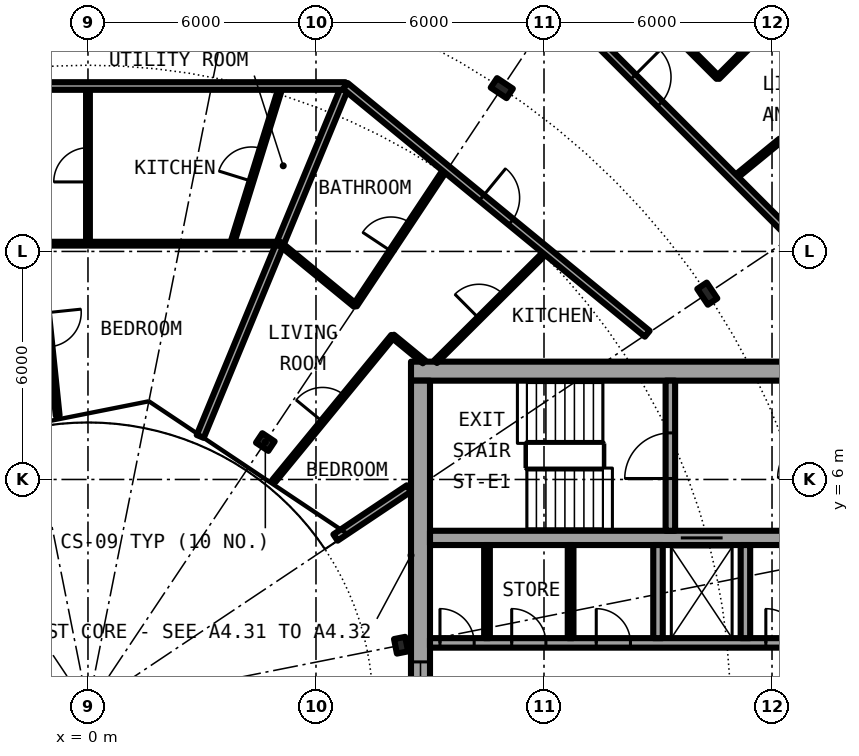
"""IFC4 building model, lengths in metres.
Left out: names, types, materials, properties, quantities, classifications, styles, units other than length and angle.
Written with IfcOpenShell. Run it as: python <this file> out.ifc"""

import sys

from ifc_helpers import new_model, si_unit, direction, frame, frame_2d, origin, origin_2d, place, context, subcontext, project, spatial, rectangle, i_section, extrude, element, fill, save


model = new_model("IFC4")
c1 = context("Model", 3, precision=1e-05, world=origin(), true_north=direction((0.0, 1.0)))
c2 = subcontext(c1, "Body", "Model", "MODEL_VIEW")
j1 = project(units=[si_unit("LENGTHUNIT", "METRE"), si_unit("PLANEANGLEUNIT", "RADIAN")], contexts=[c1])
p1 = place(None, origin())
s1 = spatial("IfcSite", under=j1, at=p1, CompositionType="ELEMENT")
p2 = place(p1, origin())
s2 = spatial("IfcBuilding", under=s1, at=p2, CompositionType="ELEMENT")
p3 = place(p2, frame((0.0, 0.0, 173.8)))
s3 = spatial("IfcBuildingStorey", under=s2, at=p3, CompositionType="ELEMENT", Elevation=173.8)
for number, where, z_axis, x_axis in (
    (1, (16.297, 10.889, 0.0), (0.0, 0.0, 1.0), (0.831, 0.556, 0.0)),
    (2, (10.889, 16.297, 0.0), (0.0, 0.0, 1.0), (0.556, 0.831, 0.0)),
):
    element("IfcColumn", number, at=place(p3, frame(where, z_axis=z_axis, x_axis=x_axis)), inside=s3, PredefinedType="COLUMN", context=c2, shape_type="SweptSolid", body=[
        extrude(i_section(OverallWidth=0.3, OverallDepth=0.5, WebThickness=0.014, FlangeThickness=0.028, FilletRadius=0.027, at=origin_2d()), origin(), (0.0, 0.0, 1.0), 3.05),
    ])
for number, where, z_axis, x_axis in (
    (3, (8.239, 1.639, 0.0), (0.0, 0.0, 1.0), (0.981, 0.195, 0.0)),
    (4, (4.667, 6.984, 0.0), (0.0, 0.0, 1.0), (0.556, 0.831, 0.0)),
):
    element("IfcColumn", number, at=place(p3, frame(where, z_axis=z_axis, x_axis=x_axis)), inside=s3, PredefinedType="COLUMN", context=c2, shape_type="SweptSolid", body=[
        extrude(i_section(OverallWidth=0.3, OverallDepth=0.39, WebThickness=0.011, FlangeThickness=0.019, FilletRadius=0.027, at=origin_2d()), origin(), (0.0, 0.0, 1.0), 3.05),
    ])
p4 = place(p3, frame((22.1, 8.85, 0.0), z_axis=(0.0, 0.0, 1.0), x_axis=(-1.0, 0.0, 0.0)))
e5 = element("IfcWall", 5, at=p4, inside=s3, PredefinedType="SHEAR", context=c2, shape_type="SweptSolid", body=[
    extrude(rectangle(XDim=13.6, YDim=0.5, at=frame_2d((6.8, 0.0))), origin(), (0.0, 0.0, 1.0), 3.05),
])
p5 = place(p4, frame((1.025, 0.0, 0.0)))
e6 = element("IfcOpeningElement", 6, at=p5, cuts=e5, PredefinedType="OPENING", context=c2, shape_type="SweptSolid", body=[
    extrude(rectangle(XDim=1.2, YDim=2.3, at=frame_2d((0.6, 1.15))), frame((0.0, 0.26, 0.0), z_axis=(0.0, -1.0, 0.0), x_axis=(1.0, 0.0, 0.0)), (0.0, 0.0, 1.0), 0.52),
])
p6 = place(p3, frame((8.75, -8.6, 0.0), z_axis=(0.0, 0.0, 1.0), x_axis=(0.0, 1.0, 0.0)))
e7 = element("IfcWall", 7, at=p6, inside=s3, PredefinedType="SHEAR", context=c2, shape_type="SweptSolid", body=[
    extrude(rectangle(XDim=17.2, YDim=0.5, at=frame_2d((8.6, 0.0))), origin(), (0.0, 0.0, 1.0), 3.05),
])
p7 = place(p6, frame((7.4, 0.0, 0.1)))
e8 = element("IfcOpeningElement", 8, at=p7, cuts=e7, PredefinedType="OPENING", context=c2, shape_type="SweptSolid", body=[
    extrude(rectangle(XDim=2.4, YDim=2.2, at=frame_2d((1.2, 1.1))), frame((0.0, 0.26, 0.0), z_axis=(0.0, -1.0, 0.0), x_axis=(1.0, 0.0, 0.0)), (0.0, 0.0, 1.0), 0.52),
])
p8 = place(p3, frame((9.0, 1.7, 0.0), z_axis=(0.0, 0.0, 1.0), x_axis=(1.0, 0.0, 0.0)))
e9 = element("IfcWall", 9, at=p8, inside=s3, PredefinedType="SHEAR", context=c2, shape_type="SweptSolid", body=[
    extrude(rectangle(XDim=10.15, YDim=0.25, at=frame_2d((5.075, 0.0))), origin(), (0.0, 0.0, 1.0), 3.05),
])
p9 = place(p8, frame((0.262, 0.0, 0.0)))
e10 = element("IfcOpeningElement", 10, at=p9, cuts=e9, PredefinedType="OPENING", context=c2, shape_type="SweptSolid", body=[
    extrude(rectangle(XDim=0.9, YDim=2.3, at=frame_2d((0.45, 1.15))), frame((0.0, 0.135, 0.0), z_axis=(0.0, -1.0, 0.0), x_axis=(1.0, 0.0, 0.0)), (0.0, 0.0, 1.0), 0.27),
])
p10 = place(p8, frame((2.15, 0.0, 0.0)))
e11 = element("IfcOpeningElement", 11, at=p10, cuts=e9, PredefinedType="OPENING", context=c2, shape_type="SweptSolid", body=[
    extrude(rectangle(XDim=0.9, YDim=2.3, at=frame_2d((0.45, 1.15))), frame((0.0, 0.135, 0.0), z_axis=(0.0, -1.0, 0.0), x_axis=(1.0, 0.0, 0.0)), (0.0, 0.0, 1.0), 0.27),
])
p11 = place(p8, frame((4.375, 0.0, 0.0)))
e12 = element("IfcOpeningElement", 12, at=p11, cuts=e9, PredefinedType="OPENING", context=c2, shape_type="SweptSolid", body=[
    extrude(rectangle(XDim=0.9, YDim=2.3, at=frame_2d((0.45, 1.15))), frame((0.0, 0.135, 0.0), z_axis=(0.0, -1.0, 0.0), x_axis=(1.0, 0.0, 0.0)), (0.0, 0.0, 1.0), 0.27),
])
p12 = place(p8, frame((8.837, 0.0, 0.0)))
e13 = element("IfcOpeningElement", 13, at=p12, cuts=e9, PredefinedType="OPENING", context=c2, shape_type="SweptSolid", body=[
    extrude(rectangle(XDim=0.9, YDim=2.3, at=frame_2d((0.45, 1.15))), frame((0.0, 0.135, 0.0), z_axis=(0.0, -1.0, 0.0), x_axis=(1.0, 0.0, 0.0)), (0.0, 0.0, 1.0), 0.27),
])
p13 = place(p3, frame((9.0, 4.462, 0.0), z_axis=(0.0, 0.0, 1.0), x_axis=(1.0, 0.0, 0.0)))
e14 = element("IfcWall", 14, at=p13, inside=s3, PredefinedType="SHEAR", context=c2, shape_type="SweptSolid", body=[
    extrude(rectangle(XDim=10.15, YDim=0.375, at=frame_2d((5.075, 0.0))), origin(), (0.0, 0.0, 1.0), 3.05),
])
p14 = place(p13, frame((6.6, 0.0, 0.0)))
e15 = element("IfcOpeningElement", 15, at=p14, cuts=e14, PredefinedType="OPENING", context=c2, shape_type="SweptSolid", body=[
    extrude(rectangle(XDim=1.1, YDim=2.3, at=frame_2d((0.55, 1.15))), frame((0.0, 0.198, 0.0), z_axis=(0.0, -1.0, 0.0), x_axis=(1.0, 0.0, 0.0)), (0.0, 0.0, 1.0), 0.395),
])
p15 = place(p3, frame((15.325, 4.65, 0.0), z_axis=(0.0, 0.0, 1.0), x_axis=(0.0, 1.0, 0.0)))
e16 = element("IfcWall", 16, at=p15, inside=s3, PredefinedType="SHEAR", context=c2, shape_type="SweptSolid", body=[
    extrude(rectangle(XDim=3.95, YDim=0.25, at=frame_2d((1.975, 0.0))), origin(), (0.0, 0.0, 1.0), 3.05),
])
p16 = place(p15, frame((1.375, 0.0, 0.0)))
e17 = element("IfcOpeningElement", 17, at=p16, cuts=e16, PredefinedType="OPENING", context=c2, shape_type="SweptSolid", body=[
    extrude(rectangle(XDim=1.2, YDim=2.3, at=frame_2d((0.6, 1.15))), frame((0.0, 0.135, 0.0), z_axis=(0.0, -1.0, 0.0), x_axis=(1.0, 0.0, 0.0)), (0.0, 0.0, 1.0), 0.27),
])
for number, where, z_axis, x_axis in (
    (18, (15.0, 1.825, 0.0), (0.0, 0.0, 1.0), (0.0, 1.0, 0.0)),
    (19, (17.3, 1.825, 0.0), (0.0, 0.0, 1.0), (0.0, 1.0, 0.0)),
):
    element("IfcWall", number, at=place(p3, frame(where, z_axis=z_axis, x_axis=x_axis)), inside=s3, PredefinedType="SOLIDWALL", context=c2, shape_type="SweptSolid", body=[
        extrude(rectangle(XDim=2.45, YDim=0.25, at=frame_2d((1.225, 0.0))), origin(), (0.0, 0.0, 1.0), 2.7),
    ])
for number, where, z_axis, x_axis in (
    (20, (10.5, 1.825, 0.0), (0.0, 0.0, 1.0), (0.0, 1.0, 0.0)),
    (21, (12.7, 1.825, 0.0), (0.0, 0.0, 1.0), (0.0, 1.0, 0.0)),
):
    element("IfcWall", number, at=place(p3, frame(where, z_axis=z_axis, x_axis=x_axis)), inside=s3, PredefinedType="PARTITIONING", context=c2, shape_type="SweptSolid", body=[
        extrude(rectangle(XDim=2.45, YDim=0.15, at=frame_2d((1.225, 0.0))), origin(), (0.0, 0.0, 1.0), 2.7),
    ])
p17 = place(p3, frame((17.004, 13.927, 0.0), z_axis=(0.0, 0.0, 1.0), x_axis=(0.773446828454, 0.633861186344, 0.0)))
e22 = element("IfcWall", 22, at=p17, inside=s3, PredefinedType="PARTITIONING", context=c2, shape_type="SweptSolid", body=[
    extrude(rectangle(XDim=1.578, YDim=0.1, at=frame_2d((0.789, 0.0))), origin(), (0.0, 0.0, 1.0), 2.7),
])
p18 = place(p3, frame((-1.266, 12.204, 0.0), z_axis=(0.0, 0.0, 1.0), x_axis=(0.103089563582, -0.994672077561, 0.0)))
e23 = element("IfcWall", 23, at=p18, inside=s3, PredefinedType="PARTITIONING", context=c2, shape_type="SweptSolid", body=[
    extrude(rectangle(XDim=4.549, YDim=0.1, at=frame_2d((2.275, 0.0))), origin(), (0.0, 0.0, 1.0), 2.7),
])
p19 = place(p18, frame((1.825, 0.0, 0.0)))
e24 = element("IfcOpeningElement", 24, at=p19, cuts=e23, PredefinedType="OPENING", context=c2, shape_type="SweptSolid", body=[
    extrude(rectangle(XDim=0.9, YDim=2.3, at=frame_2d((0.45, 1.15))), frame((0.0, 0.06, 0.0), z_axis=(0.0, -1.0, 0.0), x_axis=(1.0, 0.0, 0.0)), (0.0, 0.0, 1.0), 0.12),
])
p20 = place(p3, frame((0.0, 12.204, 0.0), z_axis=(0.0, 0.0, 1.0), x_axis=(0.0, 1.0, 0.0)))
e25 = element("IfcWall", 25, at=p20, inside=s3, PredefinedType="PARTITIONING", context=c2, shape_type="SweptSolid", body=[
    extrude(rectangle(XDim=4.149, YDim=0.1, at=frame_2d((2.074, 0.0))), origin(), (0.0, 0.0, 1.0), 2.7),
])
p21 = place(p20, frame((1.625, 0.0, 0.0)))
e26 = element("IfcOpeningElement", 26, at=p21, cuts=e25, PredefinedType="OPENING", context=c2, shape_type="SweptSolid", body=[
    extrude(rectangle(XDim=0.9, YDim=2.3, at=frame_2d((0.45, 1.15))), frame((0.0, 0.06, 0.0), z_axis=(0.0, -1.0, 0.0), x_axis=(1.0, 0.0, 0.0)), (0.0, 0.0, 1.0), 0.12),
])
p22 = place(p3, frame((2.954, 7.132, 0.0), z_axis=(0.0, 0.0, 1.0), x_axis=(0.382632652025, 0.923900564782, 0.0)))
e27 = element("IfcWall", 27, at=p22, inside=s3, PredefinedType="PARTITIONING", context=c2, shape_type="SweptSolid", body=[
    extrude(rectangle(XDim=9.98, YDim=0.2, at=frame_2d((4.99, 0.0))), origin(), (0.0, 0.0, 1.0), 2.7),
])
p23 = place(p3, frame((3.792, 12.204, 0.0), z_axis=(0.0, 0.0, 1.0), x_axis=(0.29670674532, 0.954968642041, 0.0)))
e28 = element("IfcWall", 28, at=p23, inside=s3, PredefinedType="PARTITIONING", context=c2, shape_type="SweptSolid", body=[
    extrude(rectangle(XDim=4.344, YDim=0.1, at=frame_2d((2.172, 0.0))), origin(), (0.0, 0.0, 1.0), 2.7),
])
p24 = place(p23, frame((1.722, 0.0, 0.0)))
e29 = element("IfcOpeningElement", 29, at=p24, cuts=e28, PredefinedType="OPENING", context=c2, shape_type="SweptSolid", body=[
    extrude(rectangle(XDim=0.9, YDim=2.3, at=frame_2d((0.45, 1.15))), frame((0.0, 0.06, 0.0), z_axis=(0.0, -1.0, 0.0), x_axis=(1.0, 0.0, 0.0)), (0.0, 0.0, 1.0), 0.12),
])
p25 = place(p3, frame((4.898, 5.968, 0.0), z_axis=(0.0, 0.0, 1.0), x_axis=(0.634401778971, 0.773003481776, 0.0)))
e30 = element("IfcWall", 30, at=p25, inside=s3, PredefinedType="PARTITIONING", context=c2, shape_type="SweptSolid", body=[
    extrude(rectangle(XDim=4.92, YDim=0.1, at=frame_2d((2.46, 0.0))), origin(), (0.0, 0.0, 1.0), 2.7),
])
p26 = place(p25, frame((2.01, 0.0, 0.0)))
e31 = element("IfcOpeningElement", 31, at=p26, cuts=e30, PredefinedType="OPENING", context=c2, shape_type="SweptSolid", body=[
    extrude(rectangle(XDim=0.9, YDim=2.3, at=frame_2d((0.45, 1.15))), frame((0.0, 0.06, 0.0), z_axis=(0.0, -1.0, 0.0), x_axis=(1.0, 0.0, 0.0)), (0.0, 0.0, 1.0), 0.12),
])
p27 = place(p3, frame((7.031, 10.582, 0.0), z_axis=(0.0, 0.0, 1.0), x_axis=(0.553303732327, 0.832979579457, 0.0)))
e32 = element("IfcWall", 32, at=p27, inside=s3, PredefinedType="PARTITIONING", context=c2, shape_type="SweptSolid", body=[
    extrude(rectangle(XDim=4.319, YDim=0.1, at=frame_2d((2.16, 0.0))), origin(), (0.0, 0.0, 1.0), 2.7),
])
p28 = place(p27, frame((1.71, 0.0, 0.0)))
e33 = element("IfcOpeningElement", 33, at=p28, cuts=e32, PredefinedType="OPENING", context=c2, shape_type="SweptSolid", body=[
    extrude(rectangle(XDim=0.9, YDim=2.3, at=frame_2d((0.45, 1.15))), frame((0.0, 0.06, 0.0), z_axis=(0.0, -1.0, 0.0), x_axis=(1.0, 0.0, 0.0)), (0.0, 0.0, 1.0), 0.12),
])
p29 = place(p3, frame((9.148, 9.1, 0.0), z_axis=(0.0, 0.0, 1.0), x_axis=(0.708822693149, 0.705386695138, 0.0)))
e34 = element("IfcWall", 34, at=p29, inside=s3, PredefinedType="PARTITIONING", context=c2, shape_type="SweptSolid", body=[
    extrude(rectangle(XDim=4.121, YDim=0.1, at=frame_2d((2.061, 0.0))), origin(), (0.0, 0.0, 1.0), 2.7),
])
p30 = place(p29, frame((1.611, 0.0, 0.0)))
e35 = element("IfcOpeningElement", 35, at=p30, cuts=e34, PredefinedType="OPENING", context=c2, shape_type="SweptSolid", body=[
    extrude(rectangle(XDim=0.9, YDim=2.3, at=frame_2d((0.45, 1.15))), frame((0.0, 0.06, 0.0), z_axis=(0.0, -1.0, 0.0), x_axis=(1.0, 0.0, 0.0)), (0.0, 0.0, 1.0), 0.12),
])
p31 = place(p3, frame((16.575, 16.575, 0.0), z_axis=(0.0, 0.0, 1.0), x_axis=(0.707106781187, 0.707106781187, 0.0)))
e36 = element("IfcWall", 36, at=p31, inside=s3, PredefinedType="PARTITIONING", context=c2, shape_type="SweptSolid", body=[
    extrude(rectangle(XDim=3.735, YDim=0.1, at=frame_2d((1.868, 0.0))), origin(), (0.0, 0.0, 1.0), 2.7),
])
p32 = place(p31, frame((1.417, 0.0, 0.0)))
e37 = element("IfcOpeningElement", 37, at=p32, cuts=e36, PredefinedType="OPENING", context=c2, shape_type="SweptSolid", body=[
    extrude(rectangle(XDim=0.9, YDim=2.3, at=frame_2d((0.45, 1.15))), frame((0.0, 0.06, 0.0), z_axis=(0.0, -1.0, 0.0), x_axis=(1.0, 0.0, 0.0)), (0.0, 0.0, 1.0), 0.12),
])
p33 = place(p3, frame((6.513, 4.472, 0.0), z_axis=(0.0, 0.0, 1.0), x_axis=(0.83133816625, 0.555766905579, 0.0)))
e38 = element("IfcWall", 38, at=p33, inside=s3, PredefinedType="PARTITIONING", context=c2, shape_type="SweptSolid", body=[
    extrude(rectangle(XDim=2.323, YDim=0.2, at=frame_2d((1.162, 0.0))), origin(), (0.0, 0.0, 1.0), 2.7),
])
p34 = place(p3, frame((-1.264, 12.204, 0.0), z_axis=(0.0, 0.0, 1.0), x_axis=(1.0, 0.0, 0.0)))
e39 = element("IfcWall", 39, at=p34, inside=s3, PredefinedType="PARTITIONING", context=c2, shape_type="SweptSolid", body=[
    extrude(rectangle(XDim=6.319, YDim=0.1, at=frame_2d((3.159, 0.0))), origin(), (0.0, 0.0, 1.0), 2.7),
])
p35 = place(p3, frame((5.058, 12.203, 0.0), z_axis=(0.0, 0.0, 1.0), x_axis=(0.772764723682, -0.634692588449, 0.0)))
e40 = element("IfcWall", 40, at=p35, inside=s3, PredefinedType="PARTITIONING", context=c2, shape_type="SweptSolid", body=[
    extrude(rectangle(XDim=2.557, YDim=0.1, at=frame_2d((1.278, 0.0))), origin(), (0.0, 0.0, 1.0), 2.7),
])
p36 = place(p3, frame((8.019, 9.771, 0.0), z_axis=(0.0, 0.0, 1.0), x_axis=(0.772730269942, -0.634734534995, 0.0)))
e41 = element("IfcWall", 41, at=p36, inside=s3, PredefinedType="PARTITIONING", context=c2, shape_type="SweptSolid", body=[
    extrude(rectangle(XDim=1.065, YDim=0.1, at=frame_2d((0.532, 0.0))), origin(), (0.0, 0.0, 1.0), 2.7),
])
p37 = place(p3, frame((-6.773, 16.353, 0.0), z_axis=(0.0, 0.0, 1.0), x_axis=(1.0, 0.0, 0.0)))
e42 = element("IfcWall", 42, at=p37, inside=s3, PredefinedType="PARTITIONING", context=c2, shape_type="SweptSolid", body=[
    extrude(rectangle(XDim=13.546, YDim=0.2, at=frame_2d((6.773, 0.0))), origin(), (0.0, 0.0, 1.0), 2.7),
])
p38 = place(p37, frame((4.579, 0.0, 0.0)))
e43 = element("IfcOpeningElement", 43, at=p38, cuts=e42, PredefinedType="OPENING", context=c2, shape_type="SweptSolid", body=[
    extrude(rectangle(XDim=1.0, YDim=2.3, at=frame_2d((0.5, 1.15))), frame((0.0, 0.11, 0.0), z_axis=(0.0, -1.0, 0.0), x_axis=(1.0, 0.0, 0.0)), (0.0, 0.0, 1.0), 0.22),
])
p39 = place(p3, frame((6.773, 16.353, 0.0), z_axis=(0.0, 0.0, 1.0), x_axis=(0.773034536097, -0.634363938131, 0.0)))
e44 = element("IfcWall", 44, at=p39, inside=s3, PredefinedType="PARTITIONING", context=c2, shape_type="SweptSolid", body=[
    extrude(rectangle(XDim=10.277, YDim=0.2, at=frame_2d((5.138, 0.0))), origin(), (0.0, 0.0, 1.0), 2.7),
])
p40 = place(p39, frame((4.638, 0.0, 0.0)))
e45 = element("IfcOpeningElement", 45, at=p40, cuts=e44, PredefinedType="OPENING", context=c2, shape_type="SweptSolid", body=[
    extrude(rectangle(XDim=1.0, YDim=2.3, at=frame_2d((0.5, 1.15))), frame((0.0, 0.11, 0.0), z_axis=(0.0, -1.0, 0.0), x_axis=(1.0, 0.0, 0.0)), (0.0, 0.0, 1.0), 0.22),
])
p41 = place(p3, frame((12.389, 18.542, 0.0), z_axis=(0.0, 0.0, 1.0), x_axis=(0.707106781187, -0.707106781187, 0.0)))
e46 = element("IfcWall", 46, at=p41, inside=s3, PredefinedType="PARTITIONING", context=c2, shape_type="SweptSolid", body=[
    extrude(rectangle(XDim=8.702, YDim=0.2, at=frame_2d((4.351, 0.0))), origin(), (0.0, 0.0, 1.0), 2.7),
])
p42 = place(p41, frame((2.763, 0.0, 0.0)))
e47 = element("IfcOpeningElement", 47, at=p42, cuts=e46, PredefinedType="OPENING", context=c2, shape_type="SweptSolid", body=[
    extrude(rectangle(XDim=1.0, YDim=2.3, at=frame_2d((0.5, 1.15))), frame((0.0, 0.11, 0.0), z_axis=(0.0, -1.0, 0.0), x_axis=(1.0, 0.0, 0.0)), (0.0, 0.0, 1.0), 0.22),
])
p43 = place(p3, frame((13.278, 19.872, 0.0), z_axis=(0.0, 0.0, 1.0), x_axis=(0.707080600289, -0.707132961115, 0.0)))
e48 = element("IfcWall", 48, at=p43, inside=s3, PredefinedType="PARTITIONING", context=c2, shape_type="SweptSolid", body=[
    extrude(rectangle(XDim=4.663, YDim=0.1, at=frame_2d((2.331, 0.0))), origin(), (0.0, 0.0, 1.0), 2.7),
])
p44 = place(p43, frame((0.719, 0.0, 0.0)))
e49 = element("IfcOpeningElement", 49, at=p44, cuts=e48, PredefinedType="OPENING", context=c2, shape_type="SweptSolid", body=[
    extrude(rectangle(XDim=0.9, YDim=2.3, at=frame_2d((0.45, 1.15))), frame((0.0, 0.06, 0.0), z_axis=(0.0, -1.0, 0.0), x_axis=(1.0, 0.0, 0.0)), (0.0, 0.0, 1.0), 0.12),
])
p45 = place(p14, origin())
e50 = element("IfcDoor", 50, at=p45, inside=s3, OperationType="DOUBLE_DOOR_SLIDING", PredefinedType="DOOR", context=c2, shape_type="SweptSolid", body=[
    extrude(rectangle(XDim=1.1, YDim=2.3, at=frame_2d((0.55, 1.15))), frame((0.0, 0.025, 0.0), z_axis=(0.0, -1.0, 0.0), x_axis=(1.0, 0.0, 0.0)), (0.0, 0.0, 1.0), 0.05),
])
fill(e15, e50)
p46 = place(p9, origin())
e51 = element("IfcDoor", 51, at=p46, inside=s3, OperationType="SINGLE_SWING_RIGHT", PredefinedType="DOOR", context=c2, shape_type="SweptSolid", body=[
    extrude(rectangle(XDim=0.9, YDim=2.3, at=frame_2d((0.45, 1.15))), frame((0.0, 0.025, 0.0), z_axis=(0.0, -1.0, 0.0), x_axis=(1.0, 0.0, 0.0)), (0.0, 0.0, 1.0), 0.05),
])
fill(e10, e51)
p47 = place(p10, origin())
e52 = element("IfcDoor", 52, at=p47, inside=s3, OperationType="SINGLE_SWING_RIGHT", PredefinedType="DOOR", context=c2, shape_type="SweptSolid", body=[
    extrude(rectangle(XDim=0.9, YDim=2.3, at=frame_2d((0.45, 1.15))), frame((0.0, 0.025, 0.0), z_axis=(0.0, -1.0, 0.0), x_axis=(1.0, 0.0, 0.0)), (0.0, 0.0, 1.0), 0.05),
])
fill(e11, e52)
p48 = place(p11, origin())
e53 = element("IfcDoor", 53, at=p48, inside=s3, OperationType="SINGLE_SWING_RIGHT", PredefinedType="DOOR", context=c2, shape_type="SweptSolid", body=[
    extrude(rectangle(XDim=0.9, YDim=2.3, at=frame_2d((0.45, 1.15))), frame((0.0, 0.025, 0.0), z_axis=(0.0, -1.0, 0.0), x_axis=(1.0, 0.0, 0.0)), (0.0, 0.0, 1.0), 0.05),
])
fill(e12, e53)
p49 = place(p12, origin())
e54 = element("IfcDoor", 54, at=p49, inside=s3, OperationType="SINGLE_SWING_LEFT", PredefinedType="DOOR", context=c2, shape_type="SweptSolid", body=[
    extrude(rectangle(XDim=0.9, YDim=2.3, at=frame_2d((0.45, 1.15))), frame((0.0, 0.025, 0.0), z_axis=(0.0, -1.0, 0.0), x_axis=(1.0, 0.0, 0.0)), (0.0, 0.0, 1.0), 0.05),
])
fill(e13, e54)
p50 = place(p16, origin())
e55 = element("IfcDoor", 55, at=p50, inside=s3, OperationType="SINGLE_SWING_LEFT", PredefinedType="DOOR", context=c2, shape_type="SweptSolid", body=[
    extrude(rectangle(XDim=1.2, YDim=2.3, at=frame_2d((0.6, 1.15))), frame((0.0, 0.025, 0.0), z_axis=(0.0, -1.0, 0.0), x_axis=(1.0, 0.0, 0.0)), (0.0, 0.0, 1.0), 0.05),
])
fill(e17, e55)
p51 = place(p7, origin())
e56 = element("IfcWindow", 56, at=p51, inside=s3, PartitioningType="SINGLE_PANEL", PredefinedType="WINDOW", context=c2, shape_type="SweptSolid", body=[
    extrude(rectangle(XDim=2.4, YDim=2.2, at=frame_2d((1.2, 1.1))), frame((0.0, 0.03, 0.0), z_axis=(0.0, -1.0, 0.0), x_axis=(1.0, 0.0, 0.0)), (0.0, 0.0, 1.0), 0.06),
])
fill(e8, e56)
p52 = place(p42, origin())
e57 = element("IfcDoor", 57, at=p52, inside=s3, OperationType="SINGLE_SWING_LEFT", PredefinedType="DOOR", context=c2, shape_type="SweptSolid", body=[
    extrude(rectangle(XDim=1.0, YDim=2.3, at=frame_2d((0.5, 1.15))), frame((0.0, 0.025, 0.0), z_axis=(0.0, -1.0, 0.0), x_axis=(1.0, 0.0, 0.0)), (0.0, 0.0, 1.0), 0.05),
])
fill(e47, e57)
p53 = place(p40, origin())
e58 = element("IfcDoor", 58, at=p53, inside=s3, OperationType="SINGLE_SWING_RIGHT", PredefinedType="DOOR", context=c2, shape_type="SweptSolid", body=[
    extrude(rectangle(XDim=1.0, YDim=2.3, at=frame_2d((0.5, 1.15))), frame((0.0, 0.025, 0.0), z_axis=(0.0, -1.0, 0.0), x_axis=(1.0, 0.0, 0.0)), (0.0, 0.0, 1.0), 0.05),
])
fill(e45, e58)
p54 = place(p28, origin())
e59 = element("IfcDoor", 59, at=p54, inside=s3, OperationType="SINGLE_SWING_LEFT", PredefinedType="DOOR", context=c2, shape_type="SweptSolid", body=[
    extrude(rectangle(XDim=0.9, YDim=2.3, at=frame_2d((0.45, 1.15))), frame((0.0, 0.025, 0.0), z_axis=(0.0, -1.0, 0.0), x_axis=(1.0, 0.0, 0.0)), (0.0, 0.0, 1.0), 0.05),
])
fill(e33, e59)
p55 = place(p30, origin())
e60 = element("IfcDoor", 60, at=p55, inside=s3, OperationType="SINGLE_SWING_LEFT", PredefinedType="DOOR", context=c2, shape_type="SweptSolid", body=[
    extrude(rectangle(XDim=0.9, YDim=2.3, at=frame_2d((0.45, 1.15))), frame((0.0, 0.025, 0.0), z_axis=(0.0, -1.0, 0.0), x_axis=(1.0, 0.0, 0.0)), (0.0, 0.0, 1.0), 0.05),
])
fill(e35, e60)
p56 = place(p26, origin())
e61 = element("IfcDoor", 61, at=p56, inside=s3, OperationType="SINGLE_SWING_RIGHT", PredefinedType="DOOR", context=c2, shape_type="SweptSolid", body=[
    extrude(rectangle(XDim=0.9, YDim=2.3, at=frame_2d((0.45, 1.15))), frame((0.0, 0.025, 0.0), z_axis=(0.0, -1.0, 0.0), x_axis=(1.0, 0.0, 0.0)), (0.0, 0.0, 1.0), 0.05),
])
fill(e31, e61)
p57 = place(p21, origin())
e62 = element("IfcDoor", 62, at=p57, inside=s3, OperationType="SINGLE_SWING_RIGHT", PredefinedType="DOOR", context=c2, shape_type="SweptSolid", body=[
    extrude(rectangle(XDim=0.9, YDim=2.3, at=frame_2d((0.45, 1.15))), frame((0.0, 0.025, 0.0), z_axis=(0.0, -1.0, 0.0), x_axis=(1.0, 0.0, 0.0)), (0.0, 0.0, 1.0), 0.05),
])
fill(e26, e62)
p58 = place(p24, origin())
e63 = element("IfcDoor", 63, at=p58, inside=s3, OperationType="SINGLE_SWING_LEFT", PredefinedType="DOOR", context=c2, shape_type="SweptSolid", body=[
    extrude(rectangle(XDim=0.9, YDim=2.3, at=frame_2d((0.45, 1.15))), frame((0.0, 0.025, 0.0), z_axis=(0.0, -1.0, 0.0), x_axis=(1.0, 0.0, 0.0)), (0.0, 0.0, 1.0), 0.05),
])
fill(e29, e63)
save(model, sys.argv[1])
